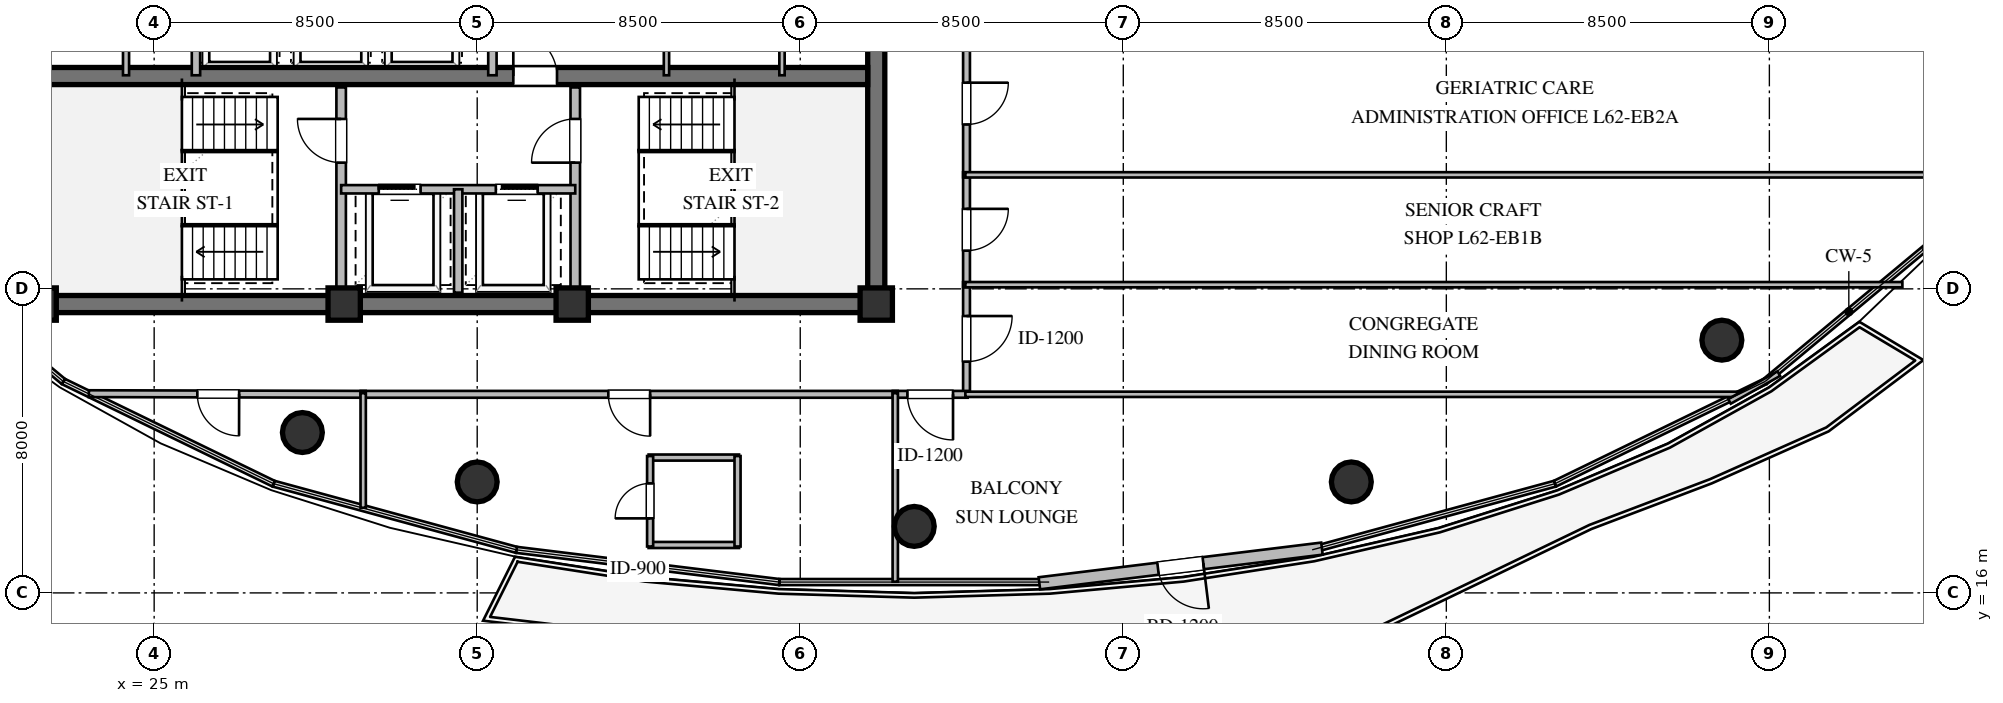
"""IFC4 building model, lengths in metres.
Left out: names, types, materials, properties, quantities, classifications, styles, units other than length and angle.
Written with IfcOpenShell. Run it as: python <this file> out.ifc"""

import sys

from ifc_helpers import new_model, si_unit, direction, frame, frame_2d, origin, origin_2d, place, context, subcontext, project, spatial, rectangle, circle, extrude, element, fill, save


model = new_model("IFC4")
c1 = context("Model", 3, precision=1e-05, world=origin(), true_north=direction((0.0, 1.0)))
c2 = subcontext(c1, "Body", "Model", "MODEL_VIEW")
j1 = project(units=[si_unit("LENGTHUNIT", "METRE"), si_unit("PLANEANGLEUNIT", "RADIAN")], contexts=[c1])
p1 = place(None, origin())
s1 = spatial("IfcSite", under=j1, at=p1, CompositionType="ELEMENT")
p2 = place(p1, origin())
s2 = spatial("IfcBuilding", under=s1, at=p2, CompositionType="ELEMENT")
p3 = place(p2, frame((0.0, 0.0, 235.2)))
s3 = spatial("IfcBuildingStorey", under=s2, at=p3, CompositionType="ELEMENT", Elevation=235.2)
p4 = place(p3, frame((21.775, 23.6, 0.0), z_axis=(0.0, 0.0, 1.0), x_axis=(1.0, 0.0, 0.0)))
e1 = element("IfcWall", 1, at=p4, inside=s3, PredefinedType="SHEAR", context=c2, shape_type="SweptSolid", body=[
    extrude(rectangle(XDim=22.45, YDim=0.45, at=frame_2d((11.225, 0.0))), origin(), (0.0, 0.0, 1.0), 3.36),
])
p5 = place(p3, frame((44.0, 23.825, 0.0), z_axis=(0.0, 0.0, 1.0), x_axis=(0.0, 1.0, 0.0)))
e2 = element("IfcWall", 2, at=p5, inside=s3, PredefinedType="SHEAR", context=c2, shape_type="SweptSolid", body=[
    extrude(rectangle(XDim=12.35, YDim=0.45, at=frame_2d((6.175, 0.0))), origin(), (0.0, 0.0, 1.0), 3.36),
])
p6 = place(p5, frame((8.675, 0.0, 0.0)))
e3 = element("IfcOpeningElement", 3, at=p6, cuts=e2, PredefinedType="OPENING", context=c2, shape_type="SweptSolid", body=[
    extrude(rectangle(XDim=1.5, YDim=2.15, at=frame_2d((0.75, 1.075))), frame((0.0, 0.235, 0.0), z_axis=(0.0, -1.0, 0.0), x_axis=(1.0, 0.0, 0.0)), (0.0, 0.0, 1.0), 0.47),
])
p7 = place(p3, frame((22.225, 29.6, 0.0), z_axis=(0.0, 0.0, 1.0), x_axis=(1.0, 0.0, 0.0)))
e4 = element("IfcWall", 4, at=p7, inside=s3, PredefinedType="SHEAR", context=c2, shape_type="SweptSolid", body=[
    extrude(rectangle(XDim=21.55, YDim=0.45, at=frame_2d((10.775, 0.0))), origin(), (0.0, 0.0, 1.0), 3.36),
])
p8 = place(p7, frame((12.225, 0.0, 0.0)))
e5 = element("IfcOpeningElement", 5, at=p8, cuts=e4, PredefinedType="OPENING", context=c2, shape_type="SweptSolid", body=[
    extrude(rectangle(XDim=1.15, YDim=2.1, at=frame_2d((0.575, 1.05))), frame((0.0, 0.235, 0.0), z_axis=(0.0, -1.0, 0.0), x_axis=(1.0, 0.0, 0.0)), (0.0, 0.0, 1.0), 0.47),
])
for number, where, z_axis, x_axis in (
    (6, (22.0, 23.6, 0.0), (0.0, 0.0, 1.0), (1.0, 0.0, 0.0)),
    (7, (30.0, 23.6, 0.0), (0.0, 0.0, 1.0), (1.0, 0.0, 0.0)),
    (8, (36.0, 23.6, 0.0), (0.0, 0.0, 1.0), (1.0, 0.0, 0.0)),
    (9, (44.0, 23.6, 0.0), (0.0, 0.0, 1.0), (1.0, 0.0, 0.0)),
):
    element("IfcColumn", number, at=place(p3, frame(where, z_axis=z_axis, x_axis=x_axis)), inside=s3, PredefinedType="COLUMN", context=c2, shape_type="SweptSolid", body=[
        extrude(rectangle(XDim=0.85, YDim=0.85, at=origin_2d()), origin(), (0.0, 0.0, 1.0), 3.6),
    ])
for number, where, z_axis, x_axis in (
    (10, (28.9, 20.22, 0.0), (0.0, 0.0, 1.0), (1.0, 0.0, 0.0)),
    (11, (33.5, 18.92, 0.0), (0.0, 0.0, 1.0), (1.0, 0.0, 0.0)),
    (12, (45.0, 17.75, 0.0), (0.0, 0.0, 1.0), (1.0, 0.0, 0.0)),
    (13, (56.5, 18.92, 0.0), (0.0, 0.0, 1.0), (1.0, 0.0, 0.0)),
    (14, (66.25, 22.65, 0.0), (0.0, 0.0, 1.0), (1.0, 0.0, 0.0)),
):
    element("IfcColumn", number, at=place(p3, frame(where, z_axis=z_axis, x_axis=x_axis)), inside=s3, PredefinedType="COLUMN", context=c2, shape_type="SweptSolid", body=[
        extrude(circle(Radius=0.525, at=origin_2d()), origin(), (0.0, 0.0, 1.0), 3.6),
    ])
p9 = place(p3, frame((76.712, 38.243, 0.0), z_axis=(0.0, 0.0, 1.0), x_axis=(-0.353659523244, -0.935374225441, 0.0)))
e15 = element("IfcWall", 15, at=p9, inside=s3, PredefinedType="STANDARD", context=c2, shape_type="SweptSolid", body=[
    extrude(rectangle(XDim=14.172, YDim=0.32, at=frame_2d((7.086, 0.0))), origin(), (0.0, 0.0, 1.0), 3.36),
])
p10 = place(p3, frame((55.727, 17.165, 0.0), z_axis=(0.0, 0.0, 1.0), x_axis=(-0.992559081031, -0.121763995755, 0.0)))
e16 = element("IfcWall", 16, at=p10, inside=s3, PredefinedType="STANDARD", context=c2, shape_type="SweptSolid", body=[
    extrude(rectangle(XDim=7.491, YDim=0.32, at=frame_2d((3.745, 0.0))), origin(), (0.0, 0.0, 1.0), 3.36),
])
p11 = place(p10, frame((3.145, 0.0, 0.0)))
e17 = element("IfcOpeningElement", 17, at=p11, cuts=e16, PredefinedType="OPENING", context=c2, shape_type="SweptSolid", body=[
    extrude(rectangle(XDim=1.2, YDim=2.15, at=frame_2d((0.6, 1.075))), frame((0.0, 0.17, 0.0), z_axis=(0.0, -1.0, 0.0), x_axis=(1.0, 0.0, 0.0)), (0.0, 0.0, 1.0), 0.34),
])
p12 = place(p3, frame((29.92, 23.9, 0.0), z_axis=(0.0, 0.0, 1.0), x_axis=(0.0, 1.0, 0.0)))
e18 = element("IfcWall", 18, at=p12, inside=s3, PredefinedType="SOLIDWALL", context=c2, shape_type="SweptSolid", body=[
    extrude(rectangle(XDim=5.4, YDim=0.25, at=frame_2d((2.7, 0.0))), origin(), (0.0, 0.0, 1.0), 3.36),
])
p13 = place(p12, frame((3.421, 0.0, 0.0)))
e19 = element("IfcOpeningElement", 19, at=p13, cuts=e18, PredefinedType="OPENING", context=c2, shape_type="SweptSolid", body=[
    extrude(rectangle(XDim=1.15, YDim=2.1, at=frame_2d((0.575, 1.05))), frame((0.0, 0.135, 0.0), z_axis=(0.0, -1.0, 0.0), x_axis=(1.0, 0.0, 0.0)), (0.0, 0.0, 1.0), 0.27),
])
p14 = place(p3, frame((36.08, 23.9, 0.0), z_axis=(0.0, 0.0, 1.0), x_axis=(0.0, 1.0, 0.0)))
e20 = element("IfcWall", 20, at=p14, inside=s3, PredefinedType="SOLIDWALL", context=c2, shape_type="SweptSolid", body=[
    extrude(rectangle(XDim=5.4, YDim=0.25, at=frame_2d((2.7, 0.0))), origin(), (0.0, 0.0, 1.0), 3.36),
])
p15 = place(p14, frame((3.421, 0.0, 0.0)))
e21 = element("IfcOpeningElement", 21, at=p15, cuts=e20, PredefinedType="OPENING", context=c2, shape_type="SweptSolid", body=[
    extrude(rectangle(XDim=1.15, YDim=2.1, at=frame_2d((0.575, 1.05))), frame((0.0, 0.135, 0.0), z_axis=(0.0, -1.0, 0.0), x_axis=(1.0, 0.0, 0.0)), (0.0, 0.0, 1.0), 0.27),
])
p16 = place(p3, frame((29.92, 26.62, 0.0), z_axis=(0.0, 0.0, 1.0), x_axis=(1.0, 0.0, 0.0)))
e22 = element("IfcWall", 22, at=p16, inside=s3, PredefinedType="SOLIDWALL", context=c2, shape_type="SweptSolid", body=[
    extrude(rectangle(XDim=6.16, YDim=0.22, at=frame_2d((3.08, 0.0))), origin(), (0.0, 0.0, 1.0), 3.36),
])
p17 = place(p16, frame((0.99, 0.0, 0.0)))
e23 = element("IfcOpeningElement", 23, at=p17, cuts=e22, PredefinedType="OPENING", context=c2, shape_type="SweptSolid", body=[
    extrude(rectangle(XDim=1.1, YDim=2.1, at=frame_2d((0.55, 1.05))), frame((0.0, 0.12, 0.0), z_axis=(0.0, -1.0, 0.0), x_axis=(1.0, 0.0, 0.0)), (0.0, 0.0, 1.0), 0.24),
])
p18 = place(p16, frame((4.07, 0.0, 0.0)))
e24 = element("IfcOpeningElement", 24, at=p18, cuts=e22, PredefinedType="OPENING", context=c2, shape_type="SweptSolid", body=[
    extrude(rectangle(XDim=1.1, YDim=2.1, at=frame_2d((0.55, 1.05))), frame((0.0, 0.12, 0.0), z_axis=(0.0, -1.0, 0.0), x_axis=(1.0, 0.0, 0.0)), (0.0, 0.0, 1.0), 0.24),
])
p19 = place(p3, frame((33.0, 23.9, 0.0), z_axis=(0.0, 0.0, 1.0), x_axis=(0.0, 1.0, 0.0)))
e25 = element("IfcWall", 25, at=p19, inside=s3, PredefinedType="SOLIDWALL", context=c2, shape_type="SweptSolid", body=[
    extrude(rectangle(XDim=2.72, YDim=0.22, at=frame_2d((1.36, 0.0))), origin(), (0.0, 0.0, 1.0), 3.36),
])
for number, where, z_axis, x_axis in (
    (26, (26.1, 29.62, 0.0), (0.0, 0.0, 1.0), (0.0, 1.0, 0.0)),
    (27, (33.9, 29.62, 0.0), (0.0, 0.0, 1.0), (0.0, 1.0, 0.0)),
):
    element("IfcWall", number, at=place(p3, frame(where, z_axis=z_axis, x_axis=x_axis)), inside=s3, PredefinedType="SOLIDWALL", context=c2, shape_type="SweptSolid", body=[
        extrude(rectangle(XDim=2.36, YDim=0.22, at=frame_2d((1.18, 0.0))), origin(), (0.0, 0.0, 1.0), 3.36),
    ])
p20 = place(p3, frame((24.26, 29.62, 0.0), z_axis=(0.0, 0.0, 1.0), x_axis=(0.0, 1.0, 0.0)))
e28 = element("IfcWall", 28, at=p20, inside=s3, PredefinedType="PLUMBINGWALL", context=c2, shape_type="SweptSolid", body=[
    extrude(rectangle(XDim=2.36, YDim=0.16, at=frame_2d((1.18, 0.0))), origin(), (0.0, 0.0, 1.0), 3.36),
])
for number, where, z_axis, x_axis in (
    (29, (38.48, 29.62, 0.0), (0.0, 0.0, 1.0), (0.0, 1.0, 0.0)),
    (30, (41.52, 29.62, 0.0), (0.0, 0.0, 1.0), (0.0, 1.0, 0.0)),
):
    element("IfcWall", number, at=place(p3, frame(where, z_axis=z_axis, x_axis=x_axis)), inside=s3, PredefinedType="PARTITIONING", context=c2, shape_type="SweptSolid", body=[
        extrude(rectangle(XDim=2.36, YDim=0.14, at=frame_2d((1.18, 0.0))), origin(), (0.0, 0.0, 1.0), 3.36),
    ])
for number, where, z_axis, x_axis in (
    (31, (38.01, 17.261, 0.0), (0.0, 0.0, 1.0), (1.0, 0.0, 0.0)),
    (32, (38.01, 19.561, 0.0), (0.0, 0.0, 1.0), (1.0, 0.0, 0.0)),
):
    element("IfcWall", number, at=place(p3, frame(where, z_axis=z_axis, x_axis=x_axis)), inside=s3, PredefinedType="PLUMBINGWALL", context=c2, shape_type="SweptSolid", body=[
        extrude(rectangle(XDim=2.38, YDim=0.16, at=frame_2d((1.19, 0.0))), origin(), (0.0, 0.0, 1.0), 3.36),
    ])
p21 = place(p3, frame((38.05, 17.221, 0.0), z_axis=(0.0, 0.0, 1.0), x_axis=(0.0, 1.0, 0.0)))
e33 = element("IfcWall", 33, at=p21, inside=s3, PredefinedType="PLUMBINGWALL", context=c2, shape_type="SweptSolid", body=[
    extrude(rectangle(XDim=2.38, YDim=0.16, at=frame_2d((1.19, 0.0))), origin(), (0.0, 0.0, 1.0), 3.36),
])
p22 = place(p21, frame((0.74, 0.0, 0.0)))
e34 = element("IfcOpeningElement", 34, at=p22, cuts=e33, PredefinedType="OPENING", context=c2, shape_type="SweptSolid", body=[
    extrude(rectangle(XDim=0.92, YDim=2.1, at=frame_2d((0.46, 1.05))), frame((0.0, 0.09, 0.0), z_axis=(0.0, -1.0, 0.0), x_axis=(1.0, 0.0, 0.0)), (0.0, 0.0, 1.0), 0.18),
])
p23 = place(p3, frame((40.35, 17.221, 0.0), z_axis=(0.0, 0.0, 1.0), x_axis=(0.0, 1.0, 0.0)))
e35 = element("IfcWall", 35, at=p23, inside=s3, PredefinedType="PLUMBINGWALL", context=c2, shape_type="SweptSolid", body=[
    extrude(rectangle(XDim=2.38, YDim=0.16, at=frame_2d((1.19, 0.0))), origin(), (0.0, 0.0, 1.0), 3.36),
])
p24 = place(p3, frame((46.375, 24.175, 0.0), z_axis=(0.0, 0.0, 1.0), x_axis=(0.0, -1.0, 0.0)))
e36 = element("IfcWall", 36, at=p24, inside=s3, PredefinedType="PARTITIONING", context=c2, shape_type="SweptSolid", body=[
    extrude(rectangle(XDim=2.98, YDim=0.18, at=frame_2d((1.49, 0.0))), origin(), (0.0, 0.0, 1.0), 3.36),
])
p25 = place(p24, frame((0.89, 0.0, 0.0)))
e37 = element("IfcOpeningElement", 37, at=p25, cuts=e36, PredefinedType="OPENING", context=c2, shape_type="SweptSolid", body=[
    extrude(rectangle(XDim=1.2, YDim=2.15, at=frame_2d((0.6, 1.075))), frame((0.0, 0.1, 0.0), z_axis=(0.0, -1.0, 0.0), x_axis=(1.0, 0.0, 0.0)), (0.0, 0.0, 1.0), 0.2),
])
p26 = place(p3, frame((46.375, 27.065, 0.0), z_axis=(0.0, 0.0, 1.0), x_axis=(0.0, -1.0, 0.0)))
e38 = element("IfcWall", 38, at=p26, inside=s3, PredefinedType="PARTITIONING", context=c2, shape_type="SweptSolid", body=[
    extrude(rectangle(XDim=3.02, YDim=0.18, at=frame_2d((1.51, 0.0))), origin(), (0.0, 0.0, 1.0), 3.36),
])
p27 = place(p26, frame((0.96, 0.0, 0.0)))
e39 = element("IfcOpeningElement", 39, at=p27, cuts=e38, PredefinedType="OPENING", context=c2, shape_type="SweptSolid", body=[
    extrude(rectangle(XDim=1.1, YDim=2.1, at=frame_2d((0.55, 1.05))), frame((0.0, 0.1, 0.0), z_axis=(0.0, -1.0, 0.0), x_axis=(1.0, 0.0, 0.0)), (0.0, 0.0, 1.0), 0.2),
])
p28 = place(p3, frame((46.375, 30.815, 0.0), z_axis=(0.0, 0.0, 1.0), x_axis=(0.0, -1.0, 0.0)))
e40 = element("IfcWall", 40, at=p28, inside=s3, PredefinedType="PARTITIONING", context=c2, shape_type="SweptSolid", body=[
    extrude(rectangle(XDim=3.88, YDim=0.18, at=frame_2d((1.94, 0.0))), origin(), (0.0, 0.0, 1.0), 3.36),
])
p29 = place(p28, frame((1.39, 0.0, 0.0)))
e41 = element("IfcOpeningElement", 41, at=p29, cuts=e40, PredefinedType="OPENING", context=c2, shape_type="SweptSolid", body=[
    extrude(rectangle(XDim=1.1, YDim=2.1, at=frame_2d((0.55, 1.05))), frame((0.0, 0.1, 0.0), z_axis=(0.0, -1.0, 0.0), x_axis=(1.0, 0.0, 0.0)), (0.0, 0.0, 1.0), 0.2),
])
p30 = place(p3, frame((30.565, 21.225, 0.0), z_axis=(0.0, 0.0, 1.0), x_axis=(-0.999997325315, 0.002312868818, 0.0)))
e42 = element("IfcWall", 42, at=p30, inside=s3, PredefinedType="PARTITIONING", context=c2, shape_type="SweptSolid", body=[
    extrude(rectangle(XDim=7.283, YDim=0.18, at=frame_2d((3.642, 0.0))), origin(), (0.0, 0.0, 1.0), 2.806),
])
p31 = place(p30, frame((3.329, 0.0, 0.0)))
e43 = element("IfcOpeningElement", 43, at=p31, cuts=e42, PredefinedType="OPENING", context=c2, shape_type="SweptSolid", body=[
    extrude(rectangle(XDim=1.1, YDim=2.1, at=frame_2d((0.55, 1.05))), frame((0.0, 0.1, 0.0), z_axis=(0.0, -1.0, 0.0), x_axis=(1.0, 0.0, 0.0)), (0.0, 0.0, 1.0), 0.2),
])
p32 = place(p3, frame((44.565, 21.225, 0.0), z_axis=(0.0, 0.0, 1.0), x_axis=(-1.0, 0.0, 0.0)))
e44 = element("IfcWall", 44, at=p32, inside=s3, PredefinedType="PARTITIONING", context=c2, shape_type="SweptSolid", body=[
    extrude(rectangle(XDim=14.13, YDim=0.18, at=frame_2d((7.065, 0.0))), origin(), (0.0, 0.0, 1.0), 2.996),
])
p33 = place(p32, frame((6.515, 0.0, 0.0)))
e45 = element("IfcOpeningElement", 45, at=p33, cuts=e44, PredefinedType="OPENING", context=c2, shape_type="SweptSolid", body=[
    extrude(rectangle(XDim=1.1, YDim=2.1, at=frame_2d((0.55, 1.05))), frame((0.0, 0.1, 0.0), z_axis=(0.0, -1.0, 0.0), x_axis=(1.0, 0.0, 0.0)), (0.0, 0.0, 1.0), 0.2),
])
p34 = place(p3, frame((46.405, 21.225, 0.0), z_axis=(0.0, 0.0, 1.0), x_axis=(-1.0, 0.0, 0.0)))
e46 = element("IfcWall", 46, at=p34, inside=s3, PredefinedType="PARTITIONING", context=c2, shape_type="SweptSolid", body=[
    extrude(rectangle(XDim=1.97, YDim=0.18, at=frame_2d((0.985, 0.0))), origin(), (0.0, 0.0, 1.0), 3.36),
])
p35 = place(p34, frame((0.385, 0.0, 0.0)))
e47 = element("IfcOpeningElement", 47, at=p35, cuts=e46, PredefinedType="OPENING", context=c2, shape_type="SweptSolid", body=[
    extrude(rectangle(XDim=1.2, YDim=2.15, at=frame_2d((0.6, 1.075))), frame((0.0, 0.1, 0.0), z_axis=(0.0, -1.0, 0.0), x_axis=(1.0, 0.0, 0.0)), (0.0, 0.0, 1.0), 0.2),
])
p36 = place(p3, frame((46.345, 24.11, 0.0), z_axis=(0.0, 0.0, 1.0), x_axis=(1.0, 0.0, 0.0)))
e48 = element("IfcWall", 48, at=p36, inside=s3, PredefinedType="PARTITIONING", context=c2, shape_type="SweptSolid", body=[
    extrude(rectangle(XDim=24.655, YDim=0.14, at=frame_2d((12.328, 0.0))), origin(), (0.0, 0.0, 1.0), 2.806),
])
p37 = place(p3, frame((66.684, 21.225, 0.0), z_axis=(0.0, 0.0, 1.0), x_axis=(-1.0, 0.0, 0.0)))
e49 = element("IfcWall", 49, at=p37, inside=s3, PredefinedType="PARTITIONING", context=c2, shape_type="SweptSolid", body=[
    extrude(rectangle(XDim=20.339, YDim=0.14, at=frame_2d((10.169, 0.0))), origin(), (0.0, 0.0, 1.0), 2.996),
])
p38 = place(p3, frame((67.748, 21.77, 0.0), z_axis=(0.0, 0.0, 1.0), x_axis=(-0.871352238731, -0.490658003153, 0.0)))
e50 = element("IfcWall", 50, at=p38, inside=s3, PredefinedType="PARTITIONING", context=c2, shape_type="SweptSolid", body=[
    extrude(rectangle(XDim=1.49, YDim=0.14, at=frame_2d((0.745, 0.0))), origin(), (0.0, 0.0, 1.0), 3.36),
])
p39 = place(p3, frame((46.345, 27.0, 0.0), z_axis=(0.0, 0.0, 1.0), x_axis=(1.0, 0.0, 0.0)))
e51 = element("IfcWall", 51, at=p39, inside=s3, PredefinedType="PARTITIONING", context=c2, shape_type="SweptSolid", body=[
    extrude(rectangle(XDim=27.209, YDim=0.14, at=frame_2d((13.604, 0.0))), origin(), (0.0, 0.0, 1.0), 2.806),
])
p40 = place(p3, frame((30.5, 21.255, 0.0), z_axis=(0.0, 0.0, 1.0), x_axis=(0.0, -1.0, 0.0)))
e52 = element("IfcWall", 52, at=p40, inside=s3, PredefinedType="PARTITIONING", context=c2, shape_type="SweptSolid", body=[
    extrude(rectangle(XDim=3.014, YDim=0.14, at=frame_2d((1.507, 0.0))), origin(), (0.0, 0.0, 1.0), 3.36),
])
p41 = place(p3, frame((44.5, 21.255, 0.0), z_axis=(0.0, 0.0, 1.0), x_axis=(0.0, -1.0, 0.0)))
e53 = element("IfcWall", 53, at=p41, inside=s3, PredefinedType="PARTITIONING", context=c2, shape_type="SweptSolid", body=[
    extrude(rectangle(XDim=4.96, YDim=0.14, at=frame_2d((2.48, 0.0))), origin(), (0.0, 0.0, 1.0), 2.806),
])
p42 = place(p11, origin())
e54 = element("IfcDoor", 54, at=p42, inside=s3, OperationType="SINGLE_SWING_LEFT", PredefinedType="DOOR", context=c2, shape_type="SweptSolid", body=[
    extrude(rectangle(XDim=1.2, YDim=2.15, at=frame_2d((0.6, 1.075))), frame((0.0, 0.025, 0.0), z_axis=(0.0, -1.0, 0.0), x_axis=(1.0, 0.0, 0.0)), (0.0, 0.0, 1.0), 0.05),
])
fill(e17, e54)
p43 = place(p13, origin())
e55 = element("IfcDoor", 55, at=p43, inside=s3, OperationType="SINGLE_SWING_RIGHT", PredefinedType="DOOR", context=c2, shape_type="SweptSolid", body=[
    extrude(rectangle(XDim=1.15, YDim=2.1, at=frame_2d((0.575, 1.05))), frame((0.0, 0.025, 0.0), z_axis=(0.0, -1.0, 0.0), x_axis=(1.0, 0.0, 0.0)), (0.0, 0.0, 1.0), 0.05),
])
fill(e19, e55)
p44 = place(p15, origin())
e56 = element("IfcDoor", 56, at=p44, inside=s3, OperationType="SINGLE_SWING_LEFT", PredefinedType="DOOR", context=c2, shape_type="SweptSolid", body=[
    extrude(rectangle(XDim=1.15, YDim=2.1, at=frame_2d((0.575, 1.05))), frame((0.0, 0.025, 0.0), z_axis=(0.0, -1.0, 0.0), x_axis=(1.0, 0.0, 0.0)), (0.0, 0.0, 1.0), 0.05),
])
fill(e21, e56)
p45 = place(p17, origin())
e57 = element("IfcDoor", 57, at=p45, inside=s3, OperationType="SLIDING_TO_LEFT", PredefinedType="DOOR", context=c2, shape_type="SweptSolid", body=[
    extrude(rectangle(XDim=1.1, YDim=2.1, at=frame_2d((0.55, 1.05))), frame((0.0, 0.025, 0.0), z_axis=(0.0, -1.0, 0.0), x_axis=(1.0, 0.0, 0.0)), (0.0, 0.0, 1.0), 0.05),
])
fill(e23, e57)
p46 = place(p18, origin())
e58 = element("IfcDoor", 58, at=p46, inside=s3, OperationType="SLIDING_TO_RIGHT", PredefinedType="DOOR", context=c2, shape_type="SweptSolid", body=[
    extrude(rectangle(XDim=1.1, YDim=2.1, at=frame_2d((0.55, 1.05))), frame((0.0, 0.025, 0.0), z_axis=(0.0, -1.0, 0.0), x_axis=(1.0, 0.0, 0.0)), (0.0, 0.0, 1.0), 0.05),
])
fill(e24, e58)
p47 = place(p8, origin())
e59 = element("IfcDoor", 59, at=p47, inside=s3, OperationType="SINGLE_SWING_LEFT", PredefinedType="DOOR", context=c2, shape_type="SweptSolid", body=[
    extrude(rectangle(XDim=1.15, YDim=2.1, at=frame_2d((0.575, 1.05))), frame((0.0, 0.025, 0.0), z_axis=(0.0, -1.0, 0.0), x_axis=(1.0, 0.0, 0.0)), (0.0, 0.0, 1.0), 0.05),
])
fill(e5, e59)
p48 = place(p22, origin())
e60 = element("IfcDoor", 60, at=p48, inside=s3, OperationType="SINGLE_SWING_LEFT", PredefinedType="DOOR", context=c2, shape_type="SweptSolid", body=[
    extrude(rectangle(XDim=0.92, YDim=2.1, at=frame_2d((0.46, 1.05))), frame((0.0, 0.025, 0.0), z_axis=(0.0, -1.0, 0.0), x_axis=(1.0, 0.0, 0.0)), (0.0, 0.0, 1.0), 0.05),
])
fill(e34, e60)
p49 = place(p25, origin())
e61 = element("IfcDoor", 61, at=p49, inside=s3, OperationType="SINGLE_SWING_LEFT", PredefinedType="DOOR", context=c2, shape_type="SweptSolid", body=[
    extrude(rectangle(XDim=1.2, YDim=2.15, at=frame_2d((0.6, 1.075))), frame((0.0, 0.025, 0.0), z_axis=(0.0, -1.0, 0.0), x_axis=(1.0, 0.0, 0.0)), (0.0, 0.0, 1.0), 0.05),
])
fill(e37, e61)
p50 = place(p27, origin())
e62 = element("IfcDoor", 62, at=p50, inside=s3, OperationType="SINGLE_SWING_LEFT", PredefinedType="DOOR", context=c2, shape_type="SweptSolid", body=[
    extrude(rectangle(XDim=1.1, YDim=2.1, at=frame_2d((0.55, 1.05))), frame((0.0, 0.025, 0.0), z_axis=(0.0, -1.0, 0.0), x_axis=(1.0, 0.0, 0.0)), (0.0, 0.0, 1.0), 0.05),
])
fill(e39, e62)
p51 = place(p29, origin())
e63 = element("IfcDoor", 63, at=p51, inside=s3, OperationType="SINGLE_SWING_LEFT", PredefinedType="DOOR", context=c2, shape_type="SweptSolid", body=[
    extrude(rectangle(XDim=1.1, YDim=2.1, at=frame_2d((0.55, 1.05))), frame((0.0, 0.025, 0.0), z_axis=(0.0, -1.0, 0.0), x_axis=(1.0, 0.0, 0.0)), (0.0, 0.0, 1.0), 0.05),
])
fill(e41, e63)
p52 = place(p31, origin())
e64 = element("IfcDoor", 64, at=p52, inside=s3, OperationType="SINGLE_SWING_LEFT", PredefinedType="DOOR", context=c2, shape_type="SweptSolid", body=[
    extrude(rectangle(XDim=1.1, YDim=2.1, at=frame_2d((0.55, 1.05))), frame((0.0, 0.025, 0.0), z_axis=(0.0, -1.0, 0.0), x_axis=(1.0, 0.0, 0.0)), (0.0, 0.0, 1.0), 0.05),
])
fill(e43, e64)
p53 = place(p33, origin())
e65 = element("IfcDoor", 65, at=p53, inside=s3, OperationType="SINGLE_SWING_LEFT", PredefinedType="DOOR", context=c2, shape_type="SweptSolid", body=[
    extrude(rectangle(XDim=1.1, YDim=2.1, at=frame_2d((0.55, 1.05))), frame((0.0, 0.025, 0.0), z_axis=(0.0, -1.0, 0.0), x_axis=(1.0, 0.0, 0.0)), (0.0, 0.0, 1.0), 0.05),
])
fill(e45, e65)
p54 = place(p35, origin())
e66 = element("IfcDoor", 66, at=p54, inside=s3, OperationType="SINGLE_SWING_LEFT", PredefinedType="DOOR", context=c2, shape_type="SweptSolid", body=[
    extrude(rectangle(XDim=1.2, YDim=2.15, at=frame_2d((0.6, 1.075))), frame((0.0, 0.025, 0.0), z_axis=(0.0, -1.0, 0.0), x_axis=(1.0, 0.0, 0.0)), (0.0, 0.0, 1.0), 0.05),
])
fill(e47, e66)
save(model, sys.argv[1])
